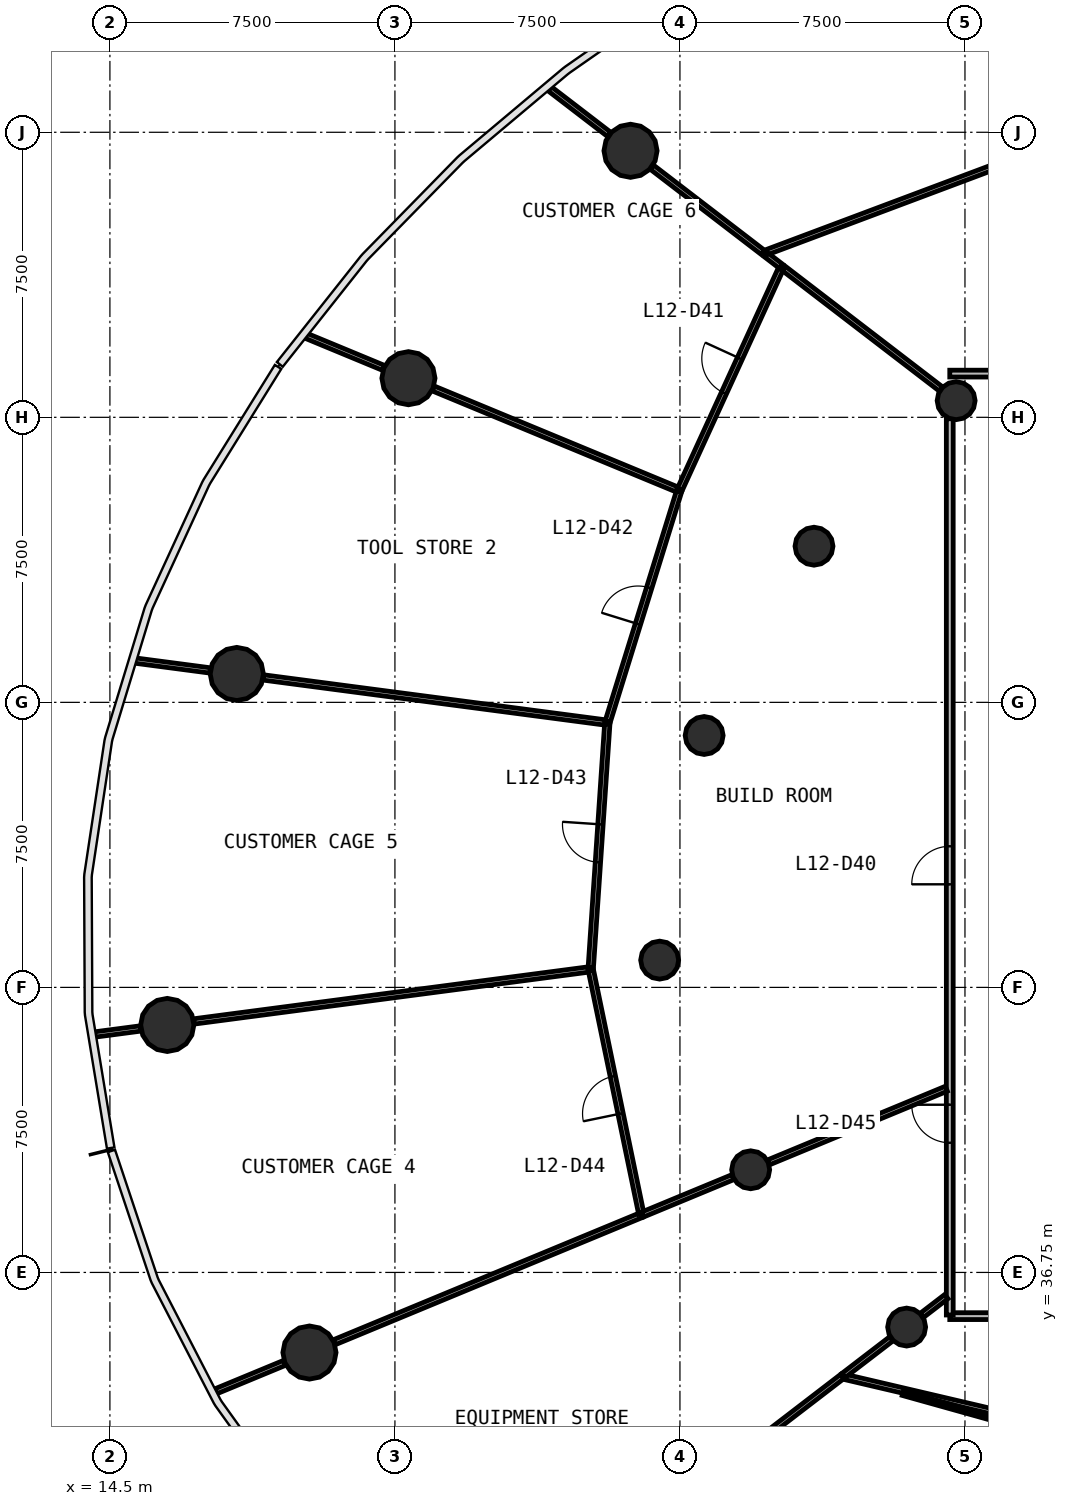
"""IFC4 building model, lengths in metres.
Left out: names, types, materials, properties, quantities, classifications, styles, units other than length and angle.
Written with IfcOpenShell. Run it as: python <this file> out.ifc"""

import sys

from ifc_helpers import new_model, si_unit, direction, frame, frame_2d, origin, origin_2d, place, context, subcontext, project, spatial, rectangle, circle, extrude, source, transform, mapped, element, fill, save


model = new_model("IFC4")
c1 = context("Model", 3, precision=1e-05, world=origin(), true_north=direction((0.0, 1.0)))
c2 = subcontext(c1, "Body", "Model", "MODEL_VIEW")
j1 = project(units=[si_unit("LENGTHUNIT", "METRE"), si_unit("PLANEANGLEUNIT", "RADIAN")], contexts=[c1])
p1 = place(None, origin())
s1 = spatial("IfcSite", under=j1, at=p1, CompositionType="ELEMENT")
p2 = place(p1, origin())
s2 = spatial("IfcBuilding", under=s1, at=p2, CompositionType="ELEMENT")
p3 = place(p2, frame((0.0, 0.0, 53.4)))
s3 = spatial("IfcBuildingStorey", under=s2, at=p3, CompositionType="ELEMENT", Elevation=53.4)
m1 = source(origin(), c2, "Body", "SweptSolid", [
    extrude(circle(Radius=0.7, at=origin_2d()), origin(), (0.0, 0.0, 1.0), 4.4),
])
for number, where, z_axis, x_axis in (
    (1, (28.199, 66.263, 0.0), (0.0, 0.0, 1.0), (1.0, 0.0, 0.0)),
    (2, (22.355, 60.279, 0.0), (0.0, 0.0, 1.0), (1.0, 0.0, 0.0)),
    (3, (17.839, 52.497, 0.0), (0.0, 0.0, 1.0), (1.0, 0.0, 0.0)),
    (4, (16.01, 43.262, 0.0), (0.0, 0.0, 1.0), (1.0, 0.0, 0.0)),
    (5, (19.751, 34.642, 0.0), (0.0, 0.0, 1.0), (1.0, 0.0, 0.0)),
):
    element("IfcColumn", number, at=place(p3, frame(where, z_axis=z_axis, x_axis=x_axis)), inside=s3, PredefinedType="COLUMN", context=c2, shape_type="MappedRepresentation", body=[
        mapped(m1, transform((0.0, 0.0, 0.0), scale=1.0)),
    ])
m2 = source(origin(), c2, "Body", "SweptSolid", [
    extrude(circle(Radius=0.5, at=origin_2d()), origin(), (0.0, 0.0, 1.0), 4.4),
])
for number, where, z_axis, x_axis in (
    (6, (36.768, 59.688, 0.0), (0.0, 0.0, 1.0), (1.0, 0.0, 0.0)),
    (7, (33.028, 55.859, 0.0), (0.0, 0.0, 1.0), (1.0, 0.0, 0.0)),
    (8, (30.137, 50.878, 0.0), (0.0, 0.0, 1.0), (1.0, 0.0, 0.0)),
    (9, (28.966, 44.968, 0.0), (0.0, 0.0, 1.0), (1.0, 0.0, 0.0)),
    (10, (31.361, 39.451, 0.0), (0.0, 0.0, 1.0), (1.0, 0.0, 0.0)),
    (11, (35.465, 35.312, 0.0), (0.0, 0.0, 1.0), (1.0, 0.0, 0.0)),
):
    element("IfcColumn", number, at=place(p3, frame(where, z_axis=z_axis, x_axis=x_axis)), inside=s3, PredefinedType="COLUMN", context=c2, shape_type="MappedRepresentation", body=[
        mapped(m2, transform((0.0, 0.0, 0.0), scale=1.0)),
    ])
p4 = place(p3, frame((67.4, 35.6, 0.0), z_axis=(0.0, 0.0, 1.0), x_axis=(-1.0, 0.0, 0.0)))
e12 = element("IfcWall", 12, at=p4, inside=s3, PredefinedType="PARTITIONING", context=c2, shape_type="SweptSolid", body=[
    extrude(rectangle(XDim=30.8, YDim=0.18, at=frame_2d((15.4, 0.0))), origin(), (0.0, 0.0, 1.0), 3.05),
])
p5 = place(p4, frame((27.45, 0.0, 0.0)))
e13 = element("IfcOpeningElement", 13, at=p5, cuts=e12, PredefinedType="OPENING", context=c2, shape_type="SweptSolid", body=[
    extrude(rectangle(XDim=0.9, YDim=2.1, at=frame_2d((0.45, 1.05))), frame((0.0, 0.1, 0.0), z_axis=(0.0, -1.0, 0.0), x_axis=(1.0, 0.0, 0.0)), (0.0, 0.0, 1.0), 0.2),
])
p6 = place(p4, frame((23.85, 0.0, 0.0)))
e14 = element("IfcOpeningElement", 14, at=p6, cuts=e12, PredefinedType="OPENING", context=c2, shape_type="SweptSolid", body=[
    extrude(rectangle(XDim=0.9, YDim=2.1, at=frame_2d((0.45, 1.05))), frame((0.0, 0.1, 0.0), z_axis=(0.0, -1.0, 0.0), x_axis=(1.0, 0.0, 0.0)), (0.0, 0.0, 1.0), 0.2),
])
p7 = place(p4, frame((20.85, 0.0, 0.0)))
e15 = element("IfcOpeningElement", 15, at=p7, cuts=e12, PredefinedType="OPENING", context=c2, shape_type="SweptSolid", body=[
    extrude(rectangle(XDim=0.9, YDim=2.1, at=frame_2d((0.45, 1.05))), frame((0.0, 0.1, 0.0), z_axis=(0.0, -1.0, 0.0), x_axis=(1.0, 0.0, 0.0)), (0.0, 0.0, 1.0), 0.2),
])
p8 = place(p4, frame((14.95, 0.0, 0.0)))
e16 = element("IfcOpeningElement", 16, at=p8, cuts=e12, PredefinedType="OPENING", context=c2, shape_type="SweptSolid", body=[
    extrude(rectangle(XDim=1.0, YDim=2.1, at=frame_2d((0.5, 1.05))), frame((0.0, 0.1, 0.0), z_axis=(0.0, -1.0, 0.0), x_axis=(1.0, 0.0, 0.0)), (0.0, 0.0, 1.0), 0.2),
])
p9 = place(p3, frame((36.6, 60.4, 0.0), z_axis=(0.0, 0.0, 1.0), x_axis=(1.0, 0.0, 0.0)))
e17 = element("IfcWall", 17, at=p9, inside=s3, PredefinedType="PARTITIONING", context=c2, shape_type="SweptSolid", body=[
    extrude(rectangle(XDim=30.8, YDim=0.18, at=frame_2d((15.4, 0.0))), origin(), (0.0, 0.0, 1.0), 3.05),
])
p10 = place(p9, frame((20.95, 0.0, 0.0)))
e18 = element("IfcOpeningElement", 18, at=p10, cuts=e17, PredefinedType="OPENING", context=c2, shape_type="SweptSolid", body=[
    extrude(rectangle(XDim=1.0, YDim=2.1, at=frame_2d((0.5, 1.05))), frame((0.0, 0.1, 0.0), z_axis=(0.0, -1.0, 0.0), x_axis=(1.0, 0.0, 0.0)), (0.0, 0.0, 1.0), 0.2),
])
p11 = place(p9, frame((17.35, 0.0, 0.0)))
e19 = element("IfcOpeningElement", 19, at=p11, cuts=e17, PredefinedType="OPENING", context=c2, shape_type="SweptSolid", body=[
    extrude(rectangle(XDim=1.0, YDim=2.1, at=frame_2d((0.5, 1.05))), frame((0.0, 0.1, 0.0), z_axis=(0.0, -1.0, 0.0), x_axis=(1.0, 0.0, 0.0)), (0.0, 0.0, 1.0), 0.2),
])
p12 = place(p9, frame((14.95, 0.0, 0.0)))
e20 = element("IfcOpeningElement", 20, at=p12, cuts=e17, PredefinedType="OPENING", context=c2, shape_type="SweptSolid", body=[
    extrude(rectangle(XDim=1.0, YDim=2.1, at=frame_2d((0.5, 1.05))), frame((0.0, 0.1, 0.0), z_axis=(0.0, -1.0, 0.0), x_axis=(1.0, 0.0, 0.0)), (0.0, 0.0, 1.0), 0.2),
])
p13 = place(p3, frame((36.6, 35.63, 0.0), z_axis=(0.0, 0.0, 1.0), x_axis=(0.0, 1.0, 0.0)))
e21 = element("IfcWall", 21, at=p13, inside=s3, PredefinedType="PARTITIONING", context=c2, shape_type="SweptSolid", body=[
    extrude(rectangle(XDim=23.583, YDim=0.18, at=frame_2d((11.791, 0.0))), origin(), (0.0, 0.0, 1.0), 3.05),
])
p14 = place(p13, frame((11.333, 0.0, 0.0)))
e22 = element("IfcOpeningElement", 22, at=p14, cuts=e21, PredefinedType="OPENING", context=c2, shape_type="SweptSolid", body=[
    extrude(rectangle(XDim=1.0, YDim=2.1, at=frame_2d((0.5, 1.05))), frame((0.0, 0.1, 0.0), z_axis=(0.0, -1.0, 0.0), x_axis=(1.0, 0.0, 0.0)), (0.0, 0.0, 1.0), 0.2),
])
p15 = place(p13, frame((4.532, 0.0, 0.0)))
e23 = element("IfcOpeningElement", 23, at=p15, cuts=e21, PredefinedType="OPENING", context=c2, shape_type="SweptSolid", body=[
    extrude(rectangle(XDim=1.0, YDim=2.1, at=frame_2d((0.5, 1.05))), frame((0.0, 0.1, 0.0), z_axis=(0.0, -1.0, 0.0), x_axis=(1.0, 0.0, 0.0)), (0.0, 0.0, 1.0), 0.2),
])
p16 = place(p3, frame((27.151, 44.729, 0.0), z_axis=(0.0, 0.0, 1.0), x_axis=(-0.991445773007, -0.130519267494, 0.0)))
e24 = element("IfcWall", 24, at=p16, inside=s3, PredefinedType="PARTITIONING", context=c2, shape_type="SweptSolid", body=[
    extrude(rectangle(XDim=10.533, YDim=0.14, at=frame_2d((5.267, 0.0))), origin(), (0.0, 0.0, 1.0), 3.05),
])
p17 = place(p3, frame((27.59, 51.214, 0.0), z_axis=(0.0, 0.0, 1.0), x_axis=(-0.991443735441, 0.13053474424, 0.0)))
e25 = element("IfcWall", 25, at=p17, inside=s3, PredefinedType="PARTITIONING", context=c2, shape_type="SweptSolid", body=[
    extrude(rectangle(XDim=9.131, YDim=0.14, at=frame_2d((4.565, 0.0))), origin(), (0.0, 0.0, 1.0), 3.05),
])
p18 = place(p3, frame((33.776, 34.016, 0.0), z_axis=(0.0, 0.0, 1.0), x_axis=(-0.793363616038, -0.608748037161, 0.0)))
e26 = element("IfcWall", 26, at=p18, inside=s3, PredefinedType="PARTITIONING", context=c2, shape_type="SweptSolid", body=[
    extrude(rectangle(XDim=8.889, YDim=0.14, at=frame_2d((4.445, 0.0))), origin(), (0.0, 0.0, 1.0), 3.05),
])
p19 = place(p18, frame((3.85, 0.0, 0.0)))
e27 = element("IfcOpeningElement", 27, at=p19, cuts=e26, PredefinedType="OPENING", context=c2, shape_type="SweptSolid", body=[
    extrude(rectangle(XDim=1.0, YDim=2.1, at=frame_2d((0.5, 1.05))), frame((0.0, 0.08, 0.0), z_axis=(0.0, -1.0, 0.0), x_axis=(1.0, 0.0, 0.0)), (0.0, 0.0, 1.0), 0.16),
])
p20 = place(p3, frame((28.489, 38.261, 0.0), z_axis=(0.0, 0.0, 1.0), x_axis=(-0.923879491354, -0.382683531727, 0.0)))
e28 = element("IfcWall", 28, at=p20, inside=s3, PredefinedType="PARTITIONING", context=c2, shape_type="SweptSolid", body=[
    extrude(rectangle(XDim=8.753, YDim=0.14, at=frame_2d((4.376, 0.0))), origin(), (0.0, 0.0, 1.0), 3.05),
])
p21 = place(p3, frame((29.484, 57.326, 0.0), z_axis=(0.0, 0.0, 1.0), x_axis=(-0.923878476662, 0.3826859814, 0.0)))
e29 = element("IfcWall", 29, at=p21, inside=s3, PredefinedType="PARTITIONING", context=c2, shape_type="SweptSolid", body=[
    extrude(rectangle(XDim=7.011, YDim=0.14, at=frame_2d((3.506, 0.0))), origin(), (0.0, 0.0, 1.0), 3.05),
])
p22 = place(p3, frame((38.19, 65.998, 0.0), z_axis=(0.0, 0.0, 1.0), x_axis=(-0.936297270661, -0.35120851492, 0.0)))
e30 = element("IfcWall", 30, at=p22, inside=s3, PredefinedType="PARTITIONING", context=c2, shape_type="SweptSolid", body=[
    extrude(rectangle(XDim=6.919, YDim=0.14, at=frame_2d((3.459, 0.0))), origin(), (0.0, 0.0, 1.0), 3.05),
])
p23 = place(p3, frame((28.483, 38.291, 0.0), z_axis=(0.0, 0.0, 1.0), x_axis=(-0.202647546794, 0.979251740758, 0.0)))
e31 = element("IfcWall", 31, at=p23, inside=s3, PredefinedType="PARTITIONING", context=c2, shape_type="SweptSolid", body=[
    extrude(rectangle(XDim=6.544, YDim=0.14, at=frame_2d((3.272, 0.0))), origin(), (0.0, 0.0, 1.0), 3.05),
])
p24 = place(p23, frame((2.694, 0.0, 0.0)))
e32 = element("IfcOpeningElement", 32, at=p24, cuts=e31, PredefinedType="OPENING", context=c2, shape_type="SweptSolid", body=[
    extrude(rectangle(XDim=1.0, YDim=2.1, at=frame_2d((0.5, 1.05))), frame((0.0, 0.08, 0.0), z_axis=(0.0, -1.0, 0.0), x_axis=(1.0, 0.0, 0.0)), (0.0, 0.0, 1.0), 0.16),
])
p25 = place(p3, frame((27.153, 44.759, 0.0), z_axis=(0.0, 0.0, 1.0), x_axis=(0.067555628739, 0.997715509063, 0.0)))
e33 = element("IfcWall", 33, at=p25, inside=s3, PredefinedType="PARTITIONING", context=c2, shape_type="SweptSolid", body=[
    extrude(rectangle(XDim=6.44, YDim=0.14, at=frame_2d((3.22, 0.0))), origin(), (0.0, 0.0, 1.0), 3.05),
])
p26 = place(p25, frame((2.79, 0.0, 0.0)))
e34 = element("IfcOpeningElement", 34, at=p26, cuts=e33, PredefinedType="OPENING", context=c2, shape_type="SweptSolid", body=[
    extrude(rectangle(XDim=1.0, YDim=2.1, at=frame_2d((0.5, 1.05))), frame((0.0, 0.08, 0.0), z_axis=(0.0, -1.0, 0.0), x_axis=(1.0, 0.0, 0.0)), (0.0, 0.0, 1.0), 0.16),
])
p27 = place(p3, frame((29.497, 57.354, 0.0), z_axis=(0.0, 0.0, 1.0), x_axis=(0.416308805512, 0.909223283057, 0.0)))
e35 = element("IfcWall", 35, at=p27, inside=s3, PredefinedType="PARTITIONING", context=c2, shape_type="SweptSolid", body=[
    extrude(rectangle(XDim=6.441, YDim=0.14, at=frame_2d((3.22, 0.0))), origin(), (0.0, 0.0, 1.0), 3.05),
])
p28 = place(p27, frame((2.791, 0.0, 0.0)))
e36 = element("IfcOpeningElement", 36, at=p28, cuts=e35, PredefinedType="OPENING", context=c2, shape_type="SweptSolid", body=[
    extrude(rectangle(XDim=1.0, YDim=2.1, at=frame_2d((0.5, 1.05))), frame((0.0, 0.08, 0.0), z_axis=(0.0, -1.0, 0.0), x_axis=(1.0, 0.0, 0.0)), (0.0, 0.0, 1.0), 0.16),
])
p29 = place(p3, frame((27.599, 51.242, 0.0), z_axis=(0.0, 0.0, 1.0), x_axis=(0.296066096507, 0.95516745469, 0.0)))
e37 = element("IfcWall", 37, at=p29, inside=s3, PredefinedType="PARTITIONING", context=c2, shape_type="SweptSolid", body=[
    extrude(rectangle(XDim=6.34, YDim=0.14, at=frame_2d((3.17, 0.0))), origin(), (0.0, 0.0, 1.0), 3.05),
])
p30 = place(p29, frame((2.689, 0.0, 0.0)))
e38 = element("IfcOpeningElement", 38, at=p30, cuts=e37, PredefinedType="OPENING", context=c2, shape_type="SweptSolid", body=[
    extrude(rectangle(XDim=1.0, YDim=2.1, at=frame_2d((0.5, 1.05))), frame((0.0, 0.08, 0.0), z_axis=(0.0, -1.0, 0.0), x_axis=(1.0, 0.0, 0.0)), (0.0, 0.0, 1.0), 0.16),
])
p31 = place(p3, frame((33.805, 34.009, 0.0), z_axis=(0.0, 0.0, 1.0), x_axis=(0.973632222489, -0.22812342127, 0.0)))
e39 = element("IfcWall", 39, at=p31, inside=s3, PredefinedType="PARTITIONING", context=c2, shape_type="SweptSolid", body=[
    extrude(rectangle(XDim=6.018, YDim=0.14, at=frame_2d((3.009, 0.0))), origin(), (0.0, 0.0, 1.0), 3.05),
])
p32 = place(p3, frame((36.367, 59.995, 0.0), z_axis=(0.0, 0.0, 1.0), x_axis=(-0.793353550187, 0.608761155467, 0.0)))
e40 = element("IfcWall", 40, at=p32, inside=s3, PredefinedType="PARTITIONING", context=c2, shape_type="SweptSolid", body=[
    extrude(rectangle(XDim=5.208, YDim=0.14, at=frame_2d((2.604, 0.0))), origin(), (0.0, 0.0, 1.0), 3.05),
])
p33 = place(p3, frame((36.51, 41.584, 0.0), z_axis=(0.0, 0.0, 1.0), x_axis=(-0.923890025086, -0.382658100067, 0.0)))
e41 = element("IfcWall", 41, at=p33, inside=s3, PredefinedType="PARTITIONING", context=c2, shape_type="SweptSolid", body=[
    extrude(rectangle(XDim=5.068, YDim=0.14, at=frame_2d((2.534, 0.0))), origin(), (0.0, 0.0, 1.0), 3.05),
])
p34 = place(p3, frame((31.688, 63.586, 0.0), z_axis=(0.0, 0.0, 1.0), x_axis=(-0.793375408023, 0.608732668701, 0.0)))
e42 = element("IfcWall", 42, at=p34, inside=s3, PredefinedType="PARTITIONING", context=c2, shape_type="SweptSolid", body=[
    extrude(rectangle(XDim=3.693, YDim=0.14, at=frame_2d((1.847, 0.0))), origin(), (0.0, 0.0, 1.0), 3.05),
])
p35 = place(p3, frame((30.894, 39.258, 0.0), z_axis=(0.0, 0.0, 1.0), x_axis=(-0.923866506459, -0.382714878523, 0.0)))
e43 = element("IfcWall", 43, at=p35, inside=s3, PredefinedType="PARTITIONING", context=c2, shape_type="SweptSolid", body=[
    extrude(rectangle(XDim=2.573, YDim=0.14, at=frame_2d((1.287, 0.0))), origin(), (0.0, 0.0, 1.0), 3.05),
])
p36 = place(p3, frame((21.704, 60.549, 0.0), z_axis=(0.0, 0.0, 1.0), x_axis=(-0.923899948789, 0.382634139392, 0.0)))
e44 = element("IfcWall", 44, at=p36, inside=s3, PredefinedType="PARTITIONING", context=c2, shape_type="SweptSolid", body=[
    extrude(rectangle(XDim=2.215, YDim=0.14, at=frame_2d((1.107, 0.0))), origin(), (0.0, 0.0, 1.0), 3.05),
])
p37 = place(p3, frame((17.141, 52.589, 0.0), z_axis=(0.0, 0.0, 1.0), x_axis=(-0.991443960057, 0.130533038219, 0.0)))
e45 = element("IfcWall", 45, at=p37, inside=s3, PredefinedType="PARTITIONING", context=c2, shape_type="SweptSolid", body=[
    extrude(rectangle(XDim=2.01, YDim=0.14, at=frame_2d((1.005, 0.0))), origin(), (0.0, 0.0, 1.0), 3.05),
])
p38 = place(p3, frame((27.641, 66.691, 0.0), z_axis=(0.0, 0.0, 1.0), x_axis=(-0.793312100237, 0.608815170325, 0.0)))
e46 = element("IfcWall", 46, at=p38, inside=s3, PredefinedType="PARTITIONING", context=c2, shape_type="SweptSolid", body=[
    extrude(rectangle(XDim=1.977, YDim=0.14, at=frame_2d((0.989, 0.0))), origin(), (0.0, 0.0, 1.0), 3.05),
])
p39 = place(p3, frame((19.1, 34.372, 0.0), z_axis=(0.0, 0.0, 1.0), x_axis=(-0.923874199787, -0.382696306447, 0.0)))
e47 = element("IfcWall", 47, at=p39, inside=s3, PredefinedType="PARTITIONING", context=c2, shape_type="SweptSolid", body=[
    extrude(rectangle(XDim=1.961, YDim=0.14, at=frame_2d((0.98, 0.0))), origin(), (0.0, 0.0, 1.0), 3.05),
])
p40 = place(p3, frame((35.065, 35.005, 0.0), z_axis=(0.0, 0.0, 1.0), x_axis=(-0.793286864057, -0.608848052732, 0.0)))
e48 = element("IfcWall", 48, at=p40, inside=s3, PredefinedType="PARTITIONING", context=c2, shape_type="SweptSolid", body=[
    extrude(rectangle(XDim=1.587, YDim=0.14, at=frame_2d((0.793, 0.0))), origin(), (0.0, 0.0, 1.0), 3.05),
])
p41 = place(p3, frame((15.311, 43.17, 0.0), z_axis=(0.0, 0.0, 1.0), x_axis=(-0.991424298155, -0.130682290411, 0.0)))
e49 = element("IfcWall", 49, at=p41, inside=s3, PredefinedType="PARTITIONING", context=c2, shape_type="SweptSolid", body=[
    extrude(rectangle(XDim=1.22, YDim=0.14, at=frame_2d((0.61, 0.0))), origin(), (0.0, 0.0, 1.0), 3.05),
])
p42 = place(p3, frame((36.51, 36.114, 0.0), z_axis=(0.0, 0.0, 1.0), x_axis=(-0.793316076519, -0.608809989025, 0.0)))
e50 = element("IfcWall", 50, at=p42, inside=s3, PredefinedType="PARTITIONING", context=c2, shape_type="SweptSolid", body=[
    extrude(rectangle(XDim=0.812, YDim=0.14, at=frame_2d((0.406, 0.0))), origin(), (0.0, 0.0, 1.0), 3.05),
])
p43 = place(p3, frame((32.155, 63.228, 0.0), z_axis=(0.0, 0.0, 1.0), x_axis=(-0.793176766219, 0.608991475745, 0.0)))
e51 = element("IfcWall", 51, at=p43, inside=s3, PredefinedType="PARTITIONING", context=c2, shape_type="SweptSolid", body=[
    extrude(rectangle(XDim=0.476, YDim=0.14, at=frame_2d((0.238, 0.0))), origin(), (0.0, 0.0, 1.0), 3.05),
])
p44 = place(p3, frame((35.364, 33.572, 0.0), z_axis=(0.0, 0.0, 1.0), x_axis=(0.963049305084, -0.269325149172, 0.0)))
e52 = element("IfcWall", 52, at=p44, inside=s3, PredefinedType="PARTITIONING", context=c2, shape_type="SweptSolid", body=[
    extrude(rectangle(XDim=2.823, YDim=0.12, at=frame_2d((1.411, 0.0))), origin(), (0.0, 0.0, 1.0), 3.05),
])
m3 = source(origin(), c2, "Body", "SweptSolid", [
    extrude(rectangle(XDim=1.0, YDim=2.1, at=frame_2d((0.5, 1.05))), frame((0.0, 0.025, 0.0), z_axis=(0.0, -1.0, 0.0), x_axis=(1.0, 0.0, 0.0)), (0.0, 0.0, 1.0), 0.05),
])
p45 = place(p14, origin())
e53 = element("IfcDoor", 53, at=p45, inside=s3, OperationType="SINGLE_SWING_LEFT", PredefinedType="DOOR", context=c2, shape_type="MappedRepresentation", body=[
    mapped(m3, transform((0.0, 0.0, 0.0), scale=1.0)),
])
fill(e22, e53)
p46 = place(p28, origin())
e54 = element("IfcDoor", 54, at=p46, inside=s3, OperationType="SINGLE_SWING_RIGHT", PredefinedType="DOOR", context=c2, shape_type="MappedRepresentation", body=[
    mapped(m3, transform((0.0, 0.0, 0.0), scale=1.0)),
])
fill(e36, e54)
p47 = place(p30, origin())
e55 = element("IfcDoor", 55, at=p47, inside=s3, OperationType="SINGLE_SWING_LEFT", PredefinedType="DOOR", context=c2, shape_type="MappedRepresentation", body=[
    mapped(m3, transform((0.0, 0.0, 0.0), scale=1.0)),
])
fill(e38, e55)
p48 = place(p26, origin())
e56 = element("IfcDoor", 56, at=p48, inside=s3, OperationType="SINGLE_SWING_RIGHT", PredefinedType="DOOR", context=c2, shape_type="MappedRepresentation", body=[
    mapped(m3, transform((0.0, 0.0, 0.0), scale=1.0)),
])
fill(e34, e56)
p49 = place(p24, origin())
e57 = element("IfcDoor", 57, at=p49, inside=s3, OperationType="SINGLE_SWING_LEFT", PredefinedType="DOOR", context=c2, shape_type="MappedRepresentation", body=[
    mapped(m3, transform((0.0, 0.0, 0.0), scale=1.0)),
])
fill(e32, e57)
p50 = place(p15, origin())
e58 = element("IfcDoor", 58, at=p50, inside=s3, OperationType="SINGLE_SWING_RIGHT", PredefinedType="DOOR", context=c2, shape_type="MappedRepresentation", body=[
    mapped(m3, transform((0.0, 0.0, 0.0), scale=1.0)),
])
fill(e23, e58)
save(model, sys.argv[1])
